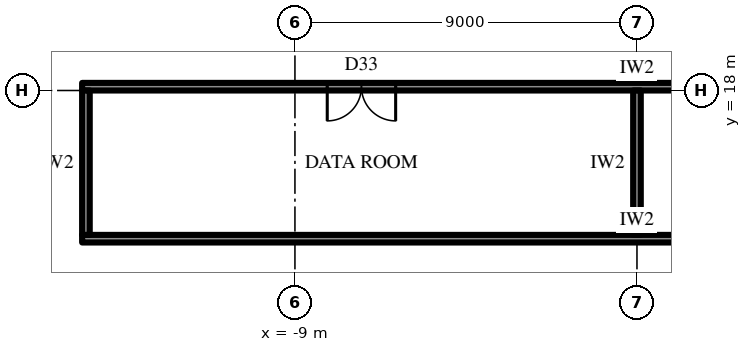
"""IFC4 building model, lengths in metres.
Left out: names, types, materials, properties, quantities, classifications, styles, units other than length and angle.
Written with IfcOpenShell. Run it as: python <this file> out.ifc"""

import sys

from ifc_helpers import new_model, si_unit, direction, frame, frame_2d, origin, place, context, subcontext, project, spatial, rectangle, extrude, element, fill, save


model = new_model("IFC4")
c1 = context("Model", 3, precision=1e-05, world=origin(), true_north=direction((0.0, 1.0)))
c2 = subcontext(c1, "Body", "Model", "MODEL_VIEW")
j1 = project(units=[si_unit("LENGTHUNIT", "METRE"), si_unit("PLANEANGLEUNIT", "RADIAN")], contexts=[c1])
p1 = place(None, origin())
s1 = spatial("IfcSite", under=j1, at=p1, CompositionType="ELEMENT")
p2 = place(p1, origin())
s2 = spatial("IfcBuilding", under=s1, at=p2, CompositionType="ELEMENT")
p3 = place(p2, frame((0.0, 0.0, 278.5)))
s3 = spatial("IfcBuildingStorey", under=s2, at=p3, CompositionType="ELEMENT", Elevation=278.5)
p4 = place(p3, frame((-14.6, 14.1, 0.0), z_axis=(0.0, 0.0, 1.0), x_axis=(1.0, 0.0, 0.0)))
e1 = element("IfcWall", 1, at=p4, inside=s3, PredefinedType="PARTITIONING", context=c2, shape_type="SweptSolid", body=[
    extrude(rectangle(XDim=29.2, YDim=0.2, at=frame_2d((14.6, 0.0))), origin(), (0.0, 0.0, 1.0), 4.0),
])
p5 = place(p3, frame((-14.6, 18.1, 0.0), z_axis=(0.0, 0.0, 1.0), x_axis=(1.0, 0.0, 0.0)))
e2 = element("IfcWall", 2, at=p5, inside=s3, PredefinedType="PARTITIONING", context=c2, shape_type="SweptSolid", body=[
    extrude(rectangle(XDim=29.2, YDim=0.2, at=frame_2d((14.6, 0.0))), origin(), (0.0, 0.0, 1.0), 4.0),
])
p6 = place(p5, frame((6.45, 0.0, 0.0)))
e3 = element("IfcOpeningElement", 3, at=p6, cuts=e2, PredefinedType="OPENING", context=c2, shape_type="SweptSolid", body=[
    extrude(rectangle(XDim=1.8, YDim=2.4, at=frame_2d((0.9, 1.2))), frame((0.0, 0.11, 0.0), z_axis=(0.0, -1.0, 0.0), x_axis=(1.0, 0.0, 0.0)), (0.0, 0.0, 1.0), 0.22),
])
p7 = place(p5, frame((20.95, 0.0, 0.0)))
e4 = element("IfcOpeningElement", 4, at=p7, cuts=e2, PredefinedType="OPENING", context=c2, shape_type="SweptSolid", body=[
    extrude(rectangle(XDim=1.8, YDim=2.4, at=frame_2d((0.9, 1.2))), frame((0.0, 0.11, 0.0), z_axis=(0.0, -1.0, 0.0), x_axis=(1.0, 0.0, 0.0)), (0.0, 0.0, 1.0), 0.22),
])
p8 = place(p3, frame((-14.5, 14.2, 0.0), z_axis=(0.0, 0.0, 1.0), x_axis=(0.0, 1.0, 0.0)))
e5 = element("IfcWall", 5, at=p8, inside=s3, PredefinedType="PARTITIONING", context=c2, shape_type="SweptSolid", body=[
    extrude(rectangle(XDim=3.8, YDim=0.2, at=frame_2d((1.9, 0.0))), origin(), (0.0, 0.0, 1.0), 4.0),
])
p9 = place(p3, frame((0.0, 14.2, 0.0), z_axis=(0.0, 0.0, 1.0), x_axis=(0.0, 1.0, 0.0)))
e6 = element("IfcWall", 6, at=p9, inside=s3, PredefinedType="PARTITIONING", context=c2, shape_type="SweptSolid", body=[
    extrude(rectangle(XDim=3.8, YDim=0.2, at=frame_2d((1.9, 0.0))), origin(), (0.0, 0.0, 1.0), 2.992),
])
p10 = place(p6, frame((1.8, 0.0, 0.0), z_axis=(0.0, 0.0, 1.0), x_axis=(-1.0, 0.0, 0.0)))
e7 = element("IfcDoor", 7, at=p10, inside=s3, OperationType="DOUBLE_DOOR_SINGLE_SWING", PredefinedType="DOOR", context=c2, shape_type="SweptSolid", body=[
    extrude(rectangle(XDim=1.8, YDim=2.4, at=frame_2d((0.9, 1.2))), frame((0.0, 0.025, 0.0), z_axis=(0.0, -1.0, 0.0), x_axis=(1.0, 0.0, 0.0)), (0.0, 0.0, 1.0), 0.05),
])
fill(e3, e7)
save(model, sys.argv[1])
